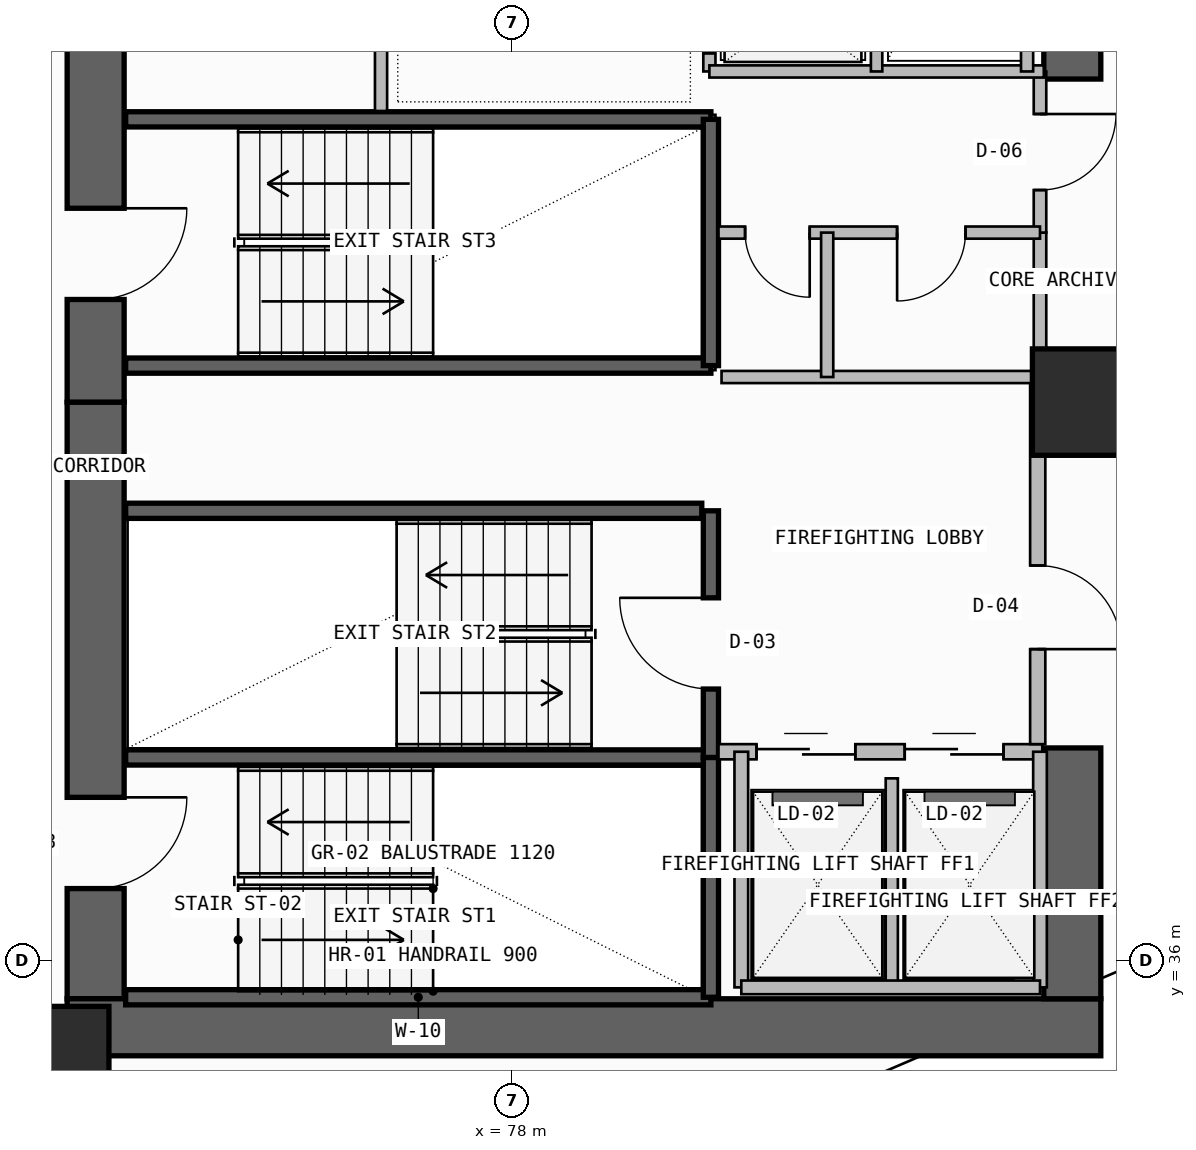
"""IFC4 building model, lengths in metres.
Left out: names, types, materials, properties, quantities, classifications, styles, units other than length and angle.
Written with IfcOpenShell. Run it as: python <this file> out.ifc"""

import sys

from ifc_helpers import new_model, si_unit, direction, frame, frame_2d, origin, origin_2d, place, context, subcontext, project, spatial, rectangle, extrude, element, fill, save


model = new_model("IFC4")
c1 = context("Model", 3, precision=1e-05, world=origin(), true_north=direction((0.0, 1.0)))
c2 = subcontext(c1, "Body", "Model", "MODEL_VIEW")
j1 = project(units=[si_unit("LENGTHUNIT", "METRE"), si_unit("PLANEANGLEUNIT", "RADIAN")], contexts=[c1])
p1 = place(None, origin())
s1 = spatial("IfcSite", under=j1, at=p1, CompositionType="ELEMENT")
p2 = place(p1, origin())
s2 = spatial("IfcBuilding", under=s1, at=p2, CompositionType="ELEMENT")
p3 = place(p2, frame((0.0, 0.0, 193.18)))
s3 = spatial("IfcBuildingStorey", under=s2, at=p3, CompositionType="ELEMENT", Elevation=193.18)
p4 = place(p3, frame((72.525, 35.5, -0.26), z_axis=(0.0, 0.0, 1.0), x_axis=(0.0, 1.0, 0.0)))
e1 = element("IfcWall", 1, at=p4, inside=s3, PredefinedType="SHEAR", context=c2, shape_type="SweptSolid", body=[
    extrude(rectangle(XDim=7.85, YDim=0.75, at=frame_2d((3.925, 0.0))), origin(), (0.0, 0.0, 1.0), 3.28),
])
p5 = place(p4, frame((1.45, 0.0, 0.26)))
e2 = element("IfcOpeningElement", 2, at=p5, cuts=e1, PredefinedType="OPENING", context=c2, shape_type="SweptSolid", body=[
    extrude(rectangle(XDim=1.2, YDim=2.2, at=frame_2d((0.6, 1.1))), frame((0.0, 0.385, 0.0), z_axis=(0.0, -1.0, 0.0), x_axis=(1.0, 0.0, 0.0)), (0.0, 0.0, 1.0), 0.77),
])
p6 = place(p3, frame((72.15, 35.125, -0.26), z_axis=(0.0, 0.0, 1.0), x_axis=(1.0, 0.0, 0.0)))
e3 = element("IfcWall", 3, at=p6, inside=s3, PredefinedType="SHEAR", context=c2, shape_type="SweptSolid", body=[
    extrude(rectangle(XDim=13.6, YDim=0.75, at=frame_2d((6.8, 0.0))), origin(), (0.0, 0.0, 1.0), 3.28),
])
p7 = place(p3, frame((85.375, 35.5, -0.26), z_axis=(0.0, 0.0, 1.0), x_axis=(0.0, 1.0, 0.0)))
e4 = element("IfcWall", 4, at=p7, inside=s3, PredefinedType="SHEAR", context=c2, shape_type="SweptSolid", body=[
    extrude(rectangle(XDim=3.3, YDim=0.75, at=frame_2d((1.65, 0.0))), origin(), (0.0, 0.0, 1.0), 3.28),
])
p8 = place(p3, frame((72.525, 43.35, -0.26), z_axis=(0.0, 0.0, 1.0), x_axis=(0.0, 1.0, 0.0)))
e5 = element("IfcWall", 5, at=p8, inside=s3, PredefinedType="SHEAR", context=c2, shape_type="SweptSolid", body=[
    extrude(rectangle(XDim=12.7, YDim=0.75, at=frame_2d((6.35, 0.0))), origin(), (0.0, 0.0, 1.0), 3.28),
])
p9 = place(p8, frame((1.35, 0.0, 0.26)))
e6 = element("IfcOpeningElement", 6, at=p9, cuts=e5, PredefinedType="OPENING", context=c2, shape_type="SweptSolid", body=[
    extrude(rectangle(XDim=1.2, YDim=2.2, at=frame_2d((0.6, 1.1))), frame((0.0, 0.385, 0.0), z_axis=(0.0, -1.0, 0.0), x_axis=(1.0, 0.0, 0.0)), (0.0, 0.0, 1.0), 0.77),
])
p10 = place(p3, frame((85.375, 47.6, -0.26), z_axis=(0.0, 0.0, 1.0), x_axis=(0.0, 1.0, 0.0)))
e7 = element("IfcWall", 7, at=p10, inside=s3, PredefinedType="SHEAR", context=c2, shape_type="SweptSolid", body=[
    extrude(rectangle(XDim=8.45, YDim=0.75, at=frame_2d((4.225, 0.0))), origin(), (0.0, 0.0, 1.0), 3.28),
])
for number, where, z_axis, x_axis in (
    (8, (72.0, 34.7, 0.0), (0.0, 0.0, 1.0), (1.0, 0.0, 0.0)),
    (9, (85.55, 43.35, 0.0), (0.0, 0.0, 1.0), (1.0, 0.0, 0.0)),
):
    element("IfcColumn", number, at=place(p3, frame(where, z_axis=z_axis, x_axis=x_axis)), inside=s3, PredefinedType="COLUMN", context=c2, shape_type="SweptSolid", body=[
        extrude(rectangle(XDim=1.4, YDim=1.4, at=origin_2d()), origin(), (0.0, 0.0, 1.0), 3.52),
    ])
for number, where, z_axis, x_axis in (
    (10, (72.92, 35.52, -0.26), (0.0, 0.0, 1.0), (1.0, 0.0, 0.0)),
    (11, (72.92, 38.675, -0.26), (0.0, 0.0, 1.0), (1.0, 0.0, 0.0)),
):
    element("IfcWall", number, at=place(p3, frame(where, z_axis=z_axis, x_axis=x_axis)), inside=s3, PredefinedType="SOLIDWALL", context=c2, shape_type="SweptSolid", body=[
        extrude(rectangle(XDim=7.7, YDim=0.2, at=frame_2d((3.85, 0.0))), origin(), (0.0, 0.0, 1.0), 3.28),
    ])
p11 = place(p3, frame((80.62, 35.52, -0.26), z_axis=(0.0, 0.0, 1.0), x_axis=(0.0, 1.0, 0.0)))
e12 = element("IfcWall", 12, at=p11, inside=s3, PredefinedType="SOLIDWALL", context=c2, shape_type="SweptSolid", body=[
    extrude(rectangle(XDim=3.155, YDim=0.2, at=frame_2d((1.578, 0.0))), origin(), (0.0, 0.0, 1.0), 3.28),
])
p12 = place(p3, frame((80.62, 38.675, -0.26), z_axis=(0.0, 0.0, 1.0), x_axis=(0.0, 1.0, 0.0)))
e13 = element("IfcWall", 13, at=p12, inside=s3, PredefinedType="SOLIDWALL", context=c2, shape_type="SweptSolid", body=[
    extrude(rectangle(XDim=3.245, YDim=0.2, at=frame_2d((1.623, 0.0))), origin(), (0.0, 0.0, 1.0), 3.28),
])
p13 = place(p12, frame((0.9, 0.0, 0.26)))
e14 = element("IfcOpeningElement", 14, at=p13, cuts=e13, PredefinedType="OPENING", context=c2, shape_type="SweptSolid", body=[
    extrude(rectangle(XDim=1.2, YDim=2.2, at=frame_2d((0.6, 1.1))), frame((0.0, 0.11, 0.0), z_axis=(0.0, -1.0, 0.0), x_axis=(1.0, 0.0, 0.0)), (0.0, 0.0, 1.0), 0.22),
])
p14 = place(p3, frame((80.72, 38.75, 0.0), z_axis=(0.0, 0.0, 1.0), x_axis=(1.0, 0.0, 0.0)))
e15 = element("IfcWall", 15, at=p14, inside=s3, PredefinedType="SOLIDWALL", context=c2, shape_type="SweptSolid", body=[
    extrude(rectangle(XDim=4.26, YDim=0.2, at=frame_2d((2.13, 0.0))), origin(), (0.0, 0.0, 1.0), 3.02),
])
p15 = place(p14, frame((0.5, 0.0, 0.0)))
e16 = element("IfcOpeningElement", 16, at=p15, cuts=e15, PredefinedType="OPENING", context=c2, shape_type="SweptSolid", body=[
    extrude(rectangle(XDim=1.3, YDim=2.3, at=frame_2d((0.65, 1.15))), frame((0.0, 0.11, 0.0), z_axis=(0.0, -1.0, 0.0), x_axis=(1.0, 0.0, 0.0)), (0.0, 0.0, 1.0), 0.22),
])
p16 = place(p14, frame((2.45, 0.0, 0.0)))
e17 = element("IfcOpeningElement", 17, at=p16, cuts=e15, PredefinedType="OPENING", context=c2, shape_type="SweptSolid", body=[
    extrude(rectangle(XDim=1.3, YDim=2.3, at=frame_2d((0.65, 1.15))), frame((0.0, 0.11, 0.0), z_axis=(0.0, -1.0, 0.0), x_axis=(1.0, 0.0, 0.0)), (0.0, 0.0, 1.0), 0.22),
])
p17 = place(p3, frame((83.0, 35.65, 0.0), z_axis=(0.0, 0.0, 1.0), x_axis=(0.0, 1.0, 0.0)))
e18 = element("IfcWall", 18, at=p17, inside=s3, PredefinedType="PLUMBINGWALL", context=c2, shape_type="SweptSolid", body=[
    extrude(rectangle(XDim=2.75, YDim=0.16, at=frame_2d((1.375, 0.0))), origin(), (0.0, 0.0, 1.0), 3.02),
])
for number, where, z_axis, x_axis in (
    (19, (84.95, 35.65, 0.0), (0.0, 0.0, 1.0), (0.0, 1.0, 0.0)),
    (20, (81.02, 35.65, 0.0), (0.0, 0.0, 1.0), (0.0, 1.0, 0.0)),
):
    element("IfcWall", number, at=place(p3, frame(where, z_axis=z_axis, x_axis=x_axis)), inside=s3, PredefinedType="SOLIDWALL", context=c2, shape_type="SweptSolid", body=[
        extrude(rectangle(XDim=3.1, YDim=0.18, at=frame_2d((1.55, 0.0))), origin(), (0.0, 0.0, 1.0), 3.02),
    ])
p18 = place(p3, frame((81.02, 35.65, 0.0), z_axis=(0.0, 0.0, 1.0), x_axis=(1.0, 0.0, 0.0)))
e21 = element("IfcWall", 21, at=p18, inside=s3, PredefinedType="SOLIDWALL", context=c2, shape_type="SweptSolid", body=[
    extrude(rectangle(XDim=3.93, YDim=0.18, at=frame_2d((1.965, 0.0))), origin(), (0.0, 0.0, 1.0), 3.02),
])
p19 = place(p3, frame((84.92, 38.85, 0.0), z_axis=(0.0, 0.0, 1.0), x_axis=(0.0, 1.0, 0.0)))
e22 = element("IfcWall", 22, at=p19, inside=s3, PredefinedType="SOLIDWALL", context=c2, shape_type="SweptSolid", body=[
    extrude(rectangle(XDim=4.83, YDim=0.2, at=frame_2d((2.415, 0.0))), origin(), (0.0, 0.0, 1.0), 3.02),
])
p20 = place(p19, frame((1.25, 0.0, 0.0)))
e23 = element("IfcOpeningElement", 23, at=p20, cuts=e22, PredefinedType="OPENING", context=c2, shape_type="SweptSolid", body=[
    extrude(rectangle(XDim=1.1, YDim=2.2, at=frame_2d((0.55, 1.1))), frame((0.0, 0.11, 0.0), z_axis=(0.0, -1.0, 0.0), x_axis=(1.0, 0.0, 0.0)), (0.0, 0.0, 1.0), 0.22),
])
p21 = place(p3, frame((72.92, 41.92, -0.26), z_axis=(0.0, 0.0, 1.0), x_axis=(1.0, 0.0, 0.0)))
e24 = element("IfcWall", 24, at=p21, inside=s3, PredefinedType="SOLIDWALL", context=c2, shape_type="SweptSolid", body=[
    extrude(rectangle(XDim=7.58, YDim=0.2, at=frame_2d((3.79, 0.0))), origin(), (0.0, 0.0, 1.0), 3.28),
])
for number, where, z_axis, x_axis in (
    (25, (72.92, 43.83, -0.26), (0.0, 0.0, 1.0), (1.0, 0.0, 0.0)),
    (26, (72.92, 47.07, -0.26), (0.0, 0.0, 1.0), (1.0, 0.0, 0.0)),
):
    element("IfcWall", number, at=place(p3, frame(where, z_axis=z_axis, x_axis=x_axis)), inside=s3, PredefinedType="SOLIDWALL", context=c2, shape_type="SweptSolid", body=[
        extrude(rectangle(XDim=7.7, YDim=0.2, at=frame_2d((3.85, 0.0))), origin(), (0.0, 0.0, 1.0), 3.28),
    ])
p22 = place(p3, frame((80.62, 43.83, -0.26), z_axis=(0.0, 0.0, 1.0), x_axis=(0.0, 1.0, 0.0)))
e27 = element("IfcWall", 27, at=p22, inside=s3, PredefinedType="SOLIDWALL", context=c2, shape_type="SweptSolid", body=[
    extrude(rectangle(XDim=3.24, YDim=0.2, at=frame_2d((1.62, 0.0))), origin(), (0.0, 0.0, 1.0), 3.28),
])
p23 = place(p3, frame((84.95, 43.68, 0.0), z_axis=(0.0, 0.0, 1.0), x_axis=(0.0, 1.0, 0.0)))
e28 = element("IfcWall", 28, at=p23, inside=s3, PredefinedType="PLUMBINGWALL", context=c2, shape_type="SweptSolid", body=[
    extrude(rectangle(XDim=1.9, YDim=0.165, at=frame_2d((0.95, 0.0))), origin(), (0.0, 0.0, 1.0), 3.02),
])
p24 = place(p3, frame((84.95, 45.58, 0.0), z_axis=(0.0, 0.0, 1.0), x_axis=(0.0, 1.0, 0.0)))
e29 = element("IfcWall", 29, at=p24, inside=s3, PredefinedType="PARTITIONING", context=c2, shape_type="SweptSolid", body=[
    extrude(rectangle(XDim=2.12, YDim=0.165, at=frame_2d((1.06, 0.0))), origin(), (0.0, 0.0, 1.0), 3.02),
])
p25 = place(p24, frame((0.56, 0.0, 0.0)))
e30 = element("IfcOpeningElement", 30, at=p25, cuts=e29, PredefinedType="OPENING", context=c2, shape_type="SweptSolid", body=[
    extrude(rectangle(XDim=1.0, YDim=2.2, at=frame_2d((0.5, 1.1))), frame((0.0, 0.093, 0.0), z_axis=(0.0, -1.0, 0.0), x_axis=(1.0, 0.0, 0.0)), (0.0, 0.0, 1.0), 0.185),
])
p26 = place(p3, frame((80.72, 45.58, 0.0), z_axis=(0.0, 0.0, 1.0), x_axis=(1.0, 0.0, 0.0)))
e31 = element("IfcWall", 31, at=p26, inside=s3, PredefinedType="PLUMBINGWALL", context=c2, shape_type="SweptSolid", body=[
    extrude(rectangle(XDim=4.23, YDim=0.16, at=frame_2d((2.115, 0.0))), origin(), (0.0, 0.0, 1.0), 3.02),
])
p27 = place(p26, frame((0.35, 0.0, 0.0)))
e32 = element("IfcOpeningElement", 32, at=p27, cuts=e31, PredefinedType="OPENING", context=c2, shape_type="SweptSolid", body=[
    extrude(rectangle(XDim=0.85, YDim=2.05, at=frame_2d((0.425, 1.025))), frame((0.0, 0.09, 0.0), z_axis=(0.0, -1.0, 0.0), x_axis=(1.0, 0.0, 0.0)), (0.0, 0.0, 1.0), 0.18),
])
p28 = place(p26, frame((2.35, 0.0, 0.0)))
e33 = element("IfcOpeningElement", 33, at=p28, cuts=e31, PredefinedType="OPENING", context=c2, shape_type="SweptSolid", body=[
    extrude(rectangle(XDim=0.9, YDim=2.1, at=frame_2d((0.45, 1.05))), frame((0.0, 0.09, 0.0), z_axis=(0.0, -1.0, 0.0), x_axis=(1.0, 0.0, 0.0)), (0.0, 0.0, 1.0), 0.18),
])
p29 = place(p3, frame((80.76, 43.68, 0.0), z_axis=(0.0, 0.0, 1.0), x_axis=(1.0, 0.0, 0.0)))
e34 = element("IfcWall", 34, at=p29, inside=s3, PredefinedType="PLUMBINGWALL", context=c2, shape_type="SweptSolid", body=[
    extrude(rectangle(XDim=4.19, YDim=0.16, at=frame_2d((2.095, 0.0))), origin(), (0.0, 0.0, 1.0), 3.02),
])
p30 = place(p3, frame((82.15, 43.68, 0.0), z_axis=(0.0, 0.0, 1.0), x_axis=(0.0, 1.0, 0.0)))
e35 = element("IfcWall", 35, at=p30, inside=s3, PredefinedType="PLUMBINGWALL", context=c2, shape_type="SweptSolid", body=[
    extrude(rectangle(XDim=1.9, YDim=0.16, at=frame_2d((0.95, 0.0))), origin(), (0.0, 0.0, 1.0), 3.02),
])
p31 = place(p3, frame((76.28, 47.18, 0.0), z_axis=(0.0, 0.0, 1.0), x_axis=(0.0, 1.0, 0.0)))
e36 = element("IfcWall", 36, at=p31, inside=s3, PredefinedType="SOLIDWALL", context=c2, shape_type="SweptSolid", body=[
    extrude(rectangle(XDim=5.14, YDim=0.16, at=frame_2d((2.57, 0.0))), origin(), (0.0, 0.0, 1.0), 3.02),
])
p32 = place(p31, frame((1.05, 0.0, 0.0)))
e37 = element("IfcOpeningElement", 37, at=p32, cuts=e36, PredefinedType="OPENING", context=c2, shape_type="SweptSolid", body=[
    extrude(rectangle(XDim=1.0, YDim=2.2, at=frame_2d((0.5, 1.1))), frame((0.0, 0.09, 0.0), z_axis=(0.0, -1.0, 0.0), x_axis=(1.0, 0.0, 0.0)), (0.0, 0.0, 1.0), 0.18),
])
p33 = place(p31, frame((3.45, 0.0, 0.0)))
e38 = element("IfcOpeningElement", 38, at=p33, cuts=e36, PredefinedType="OPENING", context=c2, shape_type="SweptSolid", body=[
    extrude(rectangle(XDim=0.9, YDim=2.1, at=frame_2d((0.45, 1.05))), frame((0.0, 0.09, 0.0), z_axis=(0.0, -1.0, 0.0), x_axis=(1.0, 0.0, 0.0)), (0.0, 0.0, 1.0), 0.18),
])
p34 = place(p3, frame((80.6, 47.7, 0.0), z_axis=(0.0, 0.0, 1.0), x_axis=(0.0, 1.0, 0.0)))
e39 = element("IfcWall", 39, at=p34, inside=s3, PredefinedType="SOLIDWALL", context=c2, shape_type="SweptSolid", body=[
    extrude(rectangle(XDim=4.6, YDim=0.16, at=frame_2d((2.3, 0.0))), origin(), (0.0, 0.0, 1.0), 3.02),
])
p35 = place(p34, frame((0.24, 0.0, 0.0)))
e40 = element("IfcOpeningElement", 40, at=p35, cuts=e39, PredefinedType="OPENING", context=c2, shape_type="SweptSolid", body=[
    extrude(rectangle(XDim=1.1, YDim=2.25, at=frame_2d((0.55, 1.125))), frame((0.0, 0.09, 0.0), z_axis=(0.0, -1.0, 0.0), x_axis=(1.0, 0.0, 0.0)), (0.0, 0.0, 1.0), 0.18),
])
p36 = place(p34, frame((1.76, 0.0, 0.0)))
e41 = element("IfcOpeningElement", 41, at=p36, cuts=e39, PredefinedType="OPENING", context=c2, shape_type="SweptSolid", body=[
    extrude(rectangle(XDim=1.1, YDim=2.25, at=frame_2d((0.55, 1.125))), frame((0.0, 0.09, 0.0), z_axis=(0.0, -1.0, 0.0), x_axis=(1.0, 0.0, 0.0)), (0.0, 0.0, 1.0), 0.18),
])
p37 = place(p34, frame((3.28, 0.0, 0.0)))
e42 = element("IfcOpeningElement", 42, at=p37, cuts=e39, PredefinedType="OPENING", context=c2, shape_type="SweptSolid", body=[
    extrude(rectangle(XDim=1.1, YDim=2.25, at=frame_2d((0.55, 1.125))), frame((0.0, 0.09, 0.0), z_axis=(0.0, -1.0, 0.0), x_axis=(1.0, 0.0, 0.0)), (0.0, 0.0, 1.0), 0.18),
])
p38 = place(p3, frame((80.6, 47.7, 0.0), z_axis=(0.0, 0.0, 1.0), x_axis=(1.0, 0.0, 0.0)))
e43 = element("IfcWall", 43, at=p38, inside=s3, PredefinedType="SOLIDWALL", context=c2, shape_type="SweptSolid", body=[
    extrude(rectangle(XDim=4.4, YDim=0.16, at=frame_2d((2.2, 0.0))), origin(), (0.0, 0.0, 1.0), 3.02),
])
p39 = place(p3, frame((82.8, 47.7, 0.0), z_axis=(0.0, 0.0, 1.0), x_axis=(0.0, 1.0, 0.0)))
e44 = element("IfcWall", 44, at=p39, inside=s3, PredefinedType="PLUMBINGWALL", context=c2, shape_type="SweptSolid", body=[
    extrude(rectangle(XDim=4.6, YDim=0.15, at=frame_2d((2.3, 0.0))), origin(), (0.0, 0.0, 1.0), 3.02),
])
p40 = place(p3, frame((84.78, 47.7, 0.0), z_axis=(0.0, 0.0, 1.0), x_axis=(0.0, 1.0, 0.0)))
e45 = element("IfcWall", 45, at=p40, inside=s3, PredefinedType="SOLIDWALL", context=c2, shape_type="SweptSolid", body=[
    extrude(rectangle(XDim=4.6, YDim=0.16, at=frame_2d((2.3, 0.0))), origin(), (0.0, 0.0, 1.0), 3.02),
])
p41 = place(p5, frame((1.2, 0.0, 0.0), z_axis=(0.0, 0.0, 1.0), x_axis=(-1.0, 0.0, 0.0)))
e46 = element("IfcDoor", 46, at=p41, inside=s3, OperationType="SINGLE_SWING_LEFT", PredefinedType="USERDEFINED", context=c2, shape_type="SweptSolid", body=[
    extrude(rectangle(XDim=1.2, YDim=2.2, at=frame_2d((0.6, 1.1))), frame((0.0, 0.025, 0.0), z_axis=(0.0, -1.0, 0.0), x_axis=(1.0, 0.0, 0.0)), (0.0, 0.0, 1.0), 0.05),
])
fill(e2, e46)
p42 = place(p13, origin())
e47 = element("IfcDoor", 47, at=p42, inside=s3, OperationType="SINGLE_SWING_RIGHT", PredefinedType="USERDEFINED", context=c2, shape_type="SweptSolid", body=[
    extrude(rectangle(XDim=1.2, YDim=2.2, at=frame_2d((0.6, 1.1))), frame((0.0, 0.025, 0.0), z_axis=(0.0, -1.0, 0.0), x_axis=(1.0, 0.0, 0.0)), (0.0, 0.0, 1.0), 0.05),
])
fill(e14, e47)
p43 = place(p15, origin())
e48 = element("IfcDoor", 48, at=p43, inside=s3, OperationType="DOUBLE_DOOR_SLIDING", PredefinedType="DOOR", context=c2, shape_type="SweptSolid", body=[
    extrude(rectangle(XDim=1.3, YDim=2.3, at=frame_2d((0.65, 1.15))), frame((0.0, 0.025, 0.0), z_axis=(0.0, -1.0, 0.0), x_axis=(1.0, 0.0, 0.0)), (0.0, 0.0, 1.0), 0.05),
])
fill(e16, e48)
p44 = place(p16, origin())
e49 = element("IfcDoor", 49, at=p44, inside=s3, OperationType="DOUBLE_DOOR_SLIDING", PredefinedType="DOOR", context=c2, shape_type="SweptSolid", body=[
    extrude(rectangle(XDim=1.3, YDim=2.3, at=frame_2d((0.65, 1.15))), frame((0.0, 0.025, 0.0), z_axis=(0.0, -1.0, 0.0), x_axis=(1.0, 0.0, 0.0)), (0.0, 0.0, 1.0), 0.05),
])
fill(e17, e49)
p45 = place(p20, frame((1.1, 0.0, 0.0), z_axis=(0.0, 0.0, 1.0), x_axis=(-1.0, 0.0, 0.0)))
e50 = element("IfcDoor", 50, at=p45, inside=s3, OperationType="SINGLE_SWING_RIGHT", PredefinedType="DOOR", context=c2, shape_type="SweptSolid", body=[
    extrude(rectangle(XDim=1.1, YDim=2.2, at=frame_2d((0.55, 1.1))), frame((0.0, 0.025, 0.0), z_axis=(0.0, -1.0, 0.0), x_axis=(1.0, 0.0, 0.0)), (0.0, 0.0, 1.0), 0.05),
])
fill(e23, e50)
p46 = place(p9, frame((1.2, 0.0, 0.0), z_axis=(0.0, 0.0, 1.0), x_axis=(-1.0, 0.0, 0.0)))
e51 = element("IfcDoor", 51, at=p46, inside=s3, OperationType="SINGLE_SWING_LEFT", PredefinedType="USERDEFINED", context=c2, shape_type="SweptSolid", body=[
    extrude(rectangle(XDim=1.2, YDim=2.2, at=frame_2d((0.6, 1.1))), frame((0.0, 0.025, 0.0), z_axis=(0.0, -1.0, 0.0), x_axis=(1.0, 0.0, 0.0)), (0.0, 0.0, 1.0), 0.05),
])
fill(e6, e51)
p47 = place(p25, frame((1.0, 0.0, 0.0), z_axis=(0.0, 0.0, 1.0), x_axis=(-1.0, 0.0, 0.0)))
e52 = element("IfcDoor", 52, at=p47, inside=s3, OperationType="SINGLE_SWING_LEFT", PredefinedType="DOOR", context=c2, shape_type="SweptSolid", body=[
    extrude(rectangle(XDim=1.0, YDim=2.2, at=frame_2d((0.5, 1.1))), frame((0.0, 0.025, 0.0), z_axis=(0.0, -1.0, 0.0), x_axis=(1.0, 0.0, 0.0)), (0.0, 0.0, 1.0), 0.05),
])
fill(e30, e52)
p48 = place(p27, frame((0.85, 0.0, 0.0), z_axis=(0.0, 0.0, 1.0), x_axis=(-1.0, 0.0, 0.0)))
e53 = element("IfcDoor", 53, at=p48, inside=s3, OperationType="SINGLE_SWING_LEFT", PredefinedType="DOOR", context=c2, shape_type="SweptSolid", body=[
    extrude(rectangle(XDim=0.85, YDim=2.05, at=frame_2d((0.425, 1.025))), frame((0.0, 0.025, 0.0), z_axis=(0.0, -1.0, 0.0), x_axis=(1.0, 0.0, 0.0)), (0.0, 0.0, 1.0), 0.05),
])
fill(e32, e53)
p49 = place(p28, frame((0.9, 0.0, 0.0), z_axis=(0.0, 0.0, 1.0), x_axis=(-1.0, 0.0, 0.0)))
e54 = element("IfcDoor", 54, at=p49, inside=s3, OperationType="SINGLE_SWING_RIGHT", PredefinedType="DOOR", context=c2, shape_type="SweptSolid", body=[
    extrude(rectangle(XDim=0.9, YDim=2.1, at=frame_2d((0.45, 1.05))), frame((0.0, 0.025, 0.0), z_axis=(0.0, -1.0, 0.0), x_axis=(1.0, 0.0, 0.0)), (0.0, 0.0, 1.0), 0.05),
])
fill(e33, e54)
p50 = place(p35, frame((1.1, 0.0, 0.0), z_axis=(0.0, 0.0, 1.0), x_axis=(-1.0, 0.0, 0.0)))
e55 = element("IfcDoor", 55, at=p50, inside=s3, OperationType="DOUBLE_DOOR_SLIDING", PredefinedType="DOOR", context=c2, shape_type="SweptSolid", body=[
    extrude(rectangle(XDim=1.1, YDim=2.25, at=frame_2d((0.55, 1.125))), frame((0.0, 0.025, 0.0), z_axis=(0.0, -1.0, 0.0), x_axis=(1.0, 0.0, 0.0)), (0.0, 0.0, 1.0), 0.05),
])
fill(e40, e55)
save(model, sys.argv[1])
